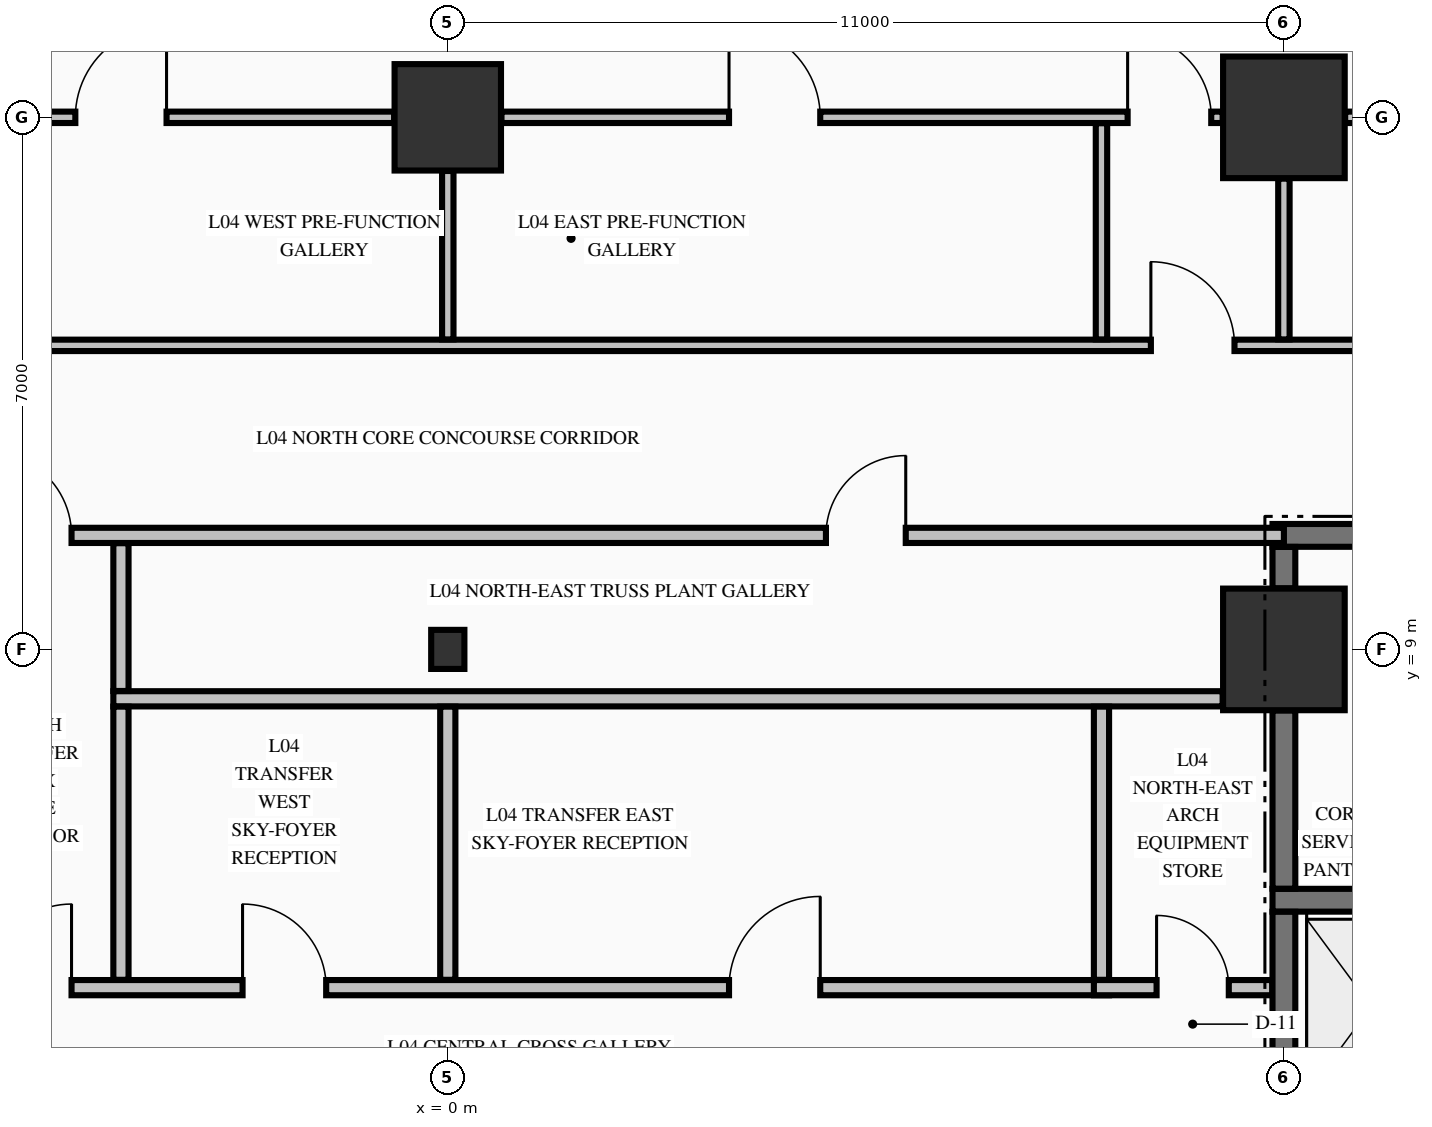
"""IFC4 building model, lengths in metres.
Left out: names, types, materials, properties, quantities, classifications, styles, units other than length and angle.
Written with IfcOpenShell. Run it as: python <this file> out.ifc"""

import sys

from ifc_helpers import new_model, si_unit, direction, frame, frame_2d, origin, origin_2d, place, context, subcontext, project, spatial, rectangle, i_section, extrude, element, fill, save


model = new_model("IFC4")
c1 = context("Model", 3, precision=1e-05, world=origin(), true_north=direction((0.0, 1.0)))
c2 = subcontext(c1, "Body", "Model", "MODEL_VIEW")
j1 = project(units=[si_unit("LENGTHUNIT", "METRE"), si_unit("PLANEANGLEUNIT", "RADIAN")], contexts=[c1])
p1 = place(None, origin())
s1 = spatial("IfcSite", under=j1, at=p1, CompositionType="ELEMENT")
p2 = place(p1, origin())
s2 = spatial("IfcBuilding", under=s1, at=p2, CompositionType="ELEMENT")
p3 = place(p2, frame((0.0, 0.0, 21.76)))
s3 = spatial("IfcBuildingStorey", under=s2, at=p3, CompositionType="ELEMENT", Elevation=21.76)
p4 = place(p3, frame((0.0, 9.0, -0.45), z_axis=(0.0, 0.0, 1.0), x_axis=(1.0, 0.0, 0.0)))
e1 = element("IfcColumn", 1, at=p4, inside=s3, PredefinedType="COLUMN", context=c2, shape_type="SweptSolid", body=[
    extrude(i_section(OverallWidth=0.437, OverallDepth=0.514, WebThickness=0.061, FlangeThickness=0.097, FilletRadius=0.015, at=origin_2d()), origin(), (0.0, 0.0, 1.0), 5.44),
])
p5 = place(p3, frame((0.0, 16.0, -0.45), z_axis=(0.0, 0.0, 1.0), x_axis=(1.0, 0.0, 0.0)))
e2 = element("IfcColumn", 2, at=p5, inside=s3, PredefinedType="COLUMN", context=c2, shape_type="SweptSolid", body=[
    extrude(rectangle(XDim=1.4, YDim=1.4, at=origin_2d()), origin(), (0.0, 0.0, 1.0), 5.44),
])
for number, where, z_axis, x_axis in (
    (3, (11.0, 9.0, -0.45), (0.0, 0.0, 1.0), (1.0, 0.0, 0.0)),
    (4, (11.0, 16.0, -0.45), (0.0, 0.0, 1.0), (1.0, 0.0, 0.0)),
):
    element("IfcColumn", number, at=place(p3, frame(where, z_axis=z_axis, x_axis=x_axis)), inside=s3, PredefinedType="COLUMN", context=c2, shape_type="SweptSolid", body=[
        extrude(rectangle(XDim=1.6, YDim=1.6, at=origin_2d()), origin(), (0.0, 0.0, 1.0), 5.44),
    ])
p6 = place(p3, frame((10.85, 5.7, 0.0), z_axis=(0.0, 0.0, 1.0), x_axis=(1.0, 0.0, 0.0)))
e5 = element("IfcWall", 5, at=p6, inside=s3, PredefinedType="SHEAR", context=c2, shape_type="SweptSolid", body=[
    extrude(rectangle(XDim=4.025, YDim=0.3, at=frame_2d((2.012, 0.0))), origin(), (0.0, 0.0, 1.0), 4.99),
])
p7 = place(p3, frame((10.85, 10.5, 0.0), z_axis=(0.0, 0.0, 1.0), x_axis=(1.0, 0.0, 0.0)))
e6 = element("IfcWall", 6, at=p7, inside=s3, PredefinedType="SHEAR", context=c2, shape_type="SweptSolid", body=[
    extrude(rectangle(XDim=3.85, YDim=0.3, at=frame_2d((1.925, 0.0))), origin(), (0.0, 0.0, 1.0), 4.99),
])
p8 = place(p7, frame((2.655, 0.0, 0.0)))
e7 = element("IfcOpeningElement", 7, at=p8, cuts=e6, PredefinedType="OPENING", context=c2, shape_type="SweptSolid", body=[
    extrude(rectangle(XDim=0.95, YDim=2.15, at=frame_2d((0.475, 1.075))), frame((0.0, 0.16, 0.0), z_axis=(0.0, -1.0, 0.0), x_axis=(1.0, 0.0, 0.0)), (0.0, 0.0, 1.0), 0.32),
])
p9 = place(p3, frame((-8.7, 4.55, 0.0), z_axis=(0.0, 0.0, 1.0), x_axis=(1.0, 0.0, 0.0)))
e8 = element("IfcWall", 8, at=p9, inside=s3, PredefinedType="PARTITIONING", context=c2, shape_type="SweptSolid", body=[
    extrude(rectangle(XDim=17.4, YDim=0.2, at=frame_2d((8.7, 0.0))), origin(), (0.0, 0.0, 1.0), 4.99),
])
p10 = place(p9, frame((2.65, 0.0, 0.0)))
e9 = element("IfcOpeningElement", 9, at=p10, cuts=e8, PredefinedType="OPENING", context=c2, shape_type="SweptSolid", body=[
    extrude(rectangle(XDim=1.1, YDim=2.15, at=frame_2d((0.55, 1.075))), frame((0.0, 0.11, 0.0), z_axis=(0.0, -1.0, 0.0), x_axis=(1.0, 0.0, 0.0)), (0.0, 0.0, 1.0), 0.22),
])
p11 = place(p9, frame((0.575, 0.0, 0.0)))
e10 = element("IfcOpeningElement", 10, at=p11, cuts=e8, PredefinedType="OPENING", context=c2, shape_type="SweptSolid", body=[
    extrude(rectangle(XDim=0.95, YDim=2.15, at=frame_2d((0.475, 1.075))), frame((0.0, 0.11, 0.0), z_axis=(0.0, -1.0, 0.0), x_axis=(1.0, 0.0, 0.0)), (0.0, 0.0, 1.0), 0.22),
])
p12 = place(p9, frame((6.0, 0.0, 0.0)))
e11 = element("IfcOpeningElement", 11, at=p12, cuts=e8, PredefinedType="OPENING", context=c2, shape_type="SweptSolid", body=[
    extrude(rectangle(XDim=1.1, YDim=2.15, at=frame_2d((0.55, 1.075))), frame((0.0, 0.11, 0.0), z_axis=(0.0, -1.0, 0.0), x_axis=(1.0, 0.0, 0.0)), (0.0, 0.0, 1.0), 0.22),
])
p13 = place(p9, frame((12.4, 0.0, 0.0)))
e12 = element("IfcOpeningElement", 12, at=p13, cuts=e8, PredefinedType="OPENING", context=c2, shape_type="SweptSolid", body=[
    extrude(rectangle(XDim=1.2, YDim=2.15, at=frame_2d((0.6, 1.075))), frame((0.0, 0.11, 0.0), z_axis=(0.0, -1.0, 0.0), x_axis=(1.0, 0.0, 0.0)), (0.0, 0.0, 1.0), 0.22),
])
p14 = place(p3, frame((8.5, 4.55, 0.0), z_axis=(0.0, 0.0, 1.0), x_axis=(1.0, 0.0, 0.0)))
e13 = element("IfcWall", 13, at=p14, inside=s3, PredefinedType="PARTITIONING", context=c2, shape_type="SweptSolid", body=[
    extrude(rectangle(XDim=2.347, YDim=0.2, at=frame_2d((1.173, 0.0))), origin(), (0.0, 0.0, 1.0), 4.99),
])
p15 = place(p14, frame((0.825, 0.0, 0.0)))
e14 = element("IfcOpeningElement", 14, at=p15, cuts=e13, PredefinedType="OPENING", context=c2, shape_type="SweptSolid", body=[
    extrude(rectangle(XDim=0.95, YDim=2.15, at=frame_2d((0.475, 1.075))), frame((0.0, 0.11, 0.0), z_axis=(0.0, -1.0, 0.0), x_axis=(1.0, 0.0, 0.0)), (0.0, 0.0, 1.0), 0.22),
])
p16 = place(p3, frame((-4.4, 8.35, 0.0), z_axis=(0.0, 0.0, 1.0), x_axis=(1.0, 0.0, 0.0)))
e15 = element("IfcWall", 15, at=p16, inside=s3, PredefinedType="PARTITIONING", context=c2, shape_type="SweptSolid", body=[
    extrude(rectangle(XDim=14.594, YDim=0.2, at=frame_2d((7.297, 0.0))), origin(), (0.0, 0.0, 1.0), 3.332),
])
p17 = place(p3, frame((-11.0, 10.5, 0.0), z_axis=(0.0, 0.0, 1.0), x_axis=(1.0, 0.0, 0.0)))
e16 = element("IfcWall", 16, at=p17, inside=s3, PredefinedType="PARTITIONING", context=c2, shape_type="SweptSolid", body=[
    extrude(rectangle(XDim=22.0, YDim=0.2, at=frame_2d((11.0, 0.0))), origin(), (0.0, 0.0, 1.0), 3.332),
])
p18 = place(p17, frame((4.95, 0.0, 0.0)))
e17 = element("IfcOpeningElement", 17, at=p18, cuts=e16, PredefinedType="OPENING", context=c2, shape_type="SweptSolid", body=[
    extrude(rectangle(XDim=1.1, YDim=2.15, at=frame_2d((0.55, 1.075))), frame((0.0, 0.11, 0.0), z_axis=(0.0, -1.0, 0.0), x_axis=(1.0, 0.0, 0.0)), (0.0, 0.0, 1.0), 0.22),
])
p19 = place(p17, frame((15.975, 0.0, 0.0)))
e18 = element("IfcOpeningElement", 18, at=p19, cuts=e16, PredefinedType="OPENING", context=c2, shape_type="SweptSolid", body=[
    extrude(rectangle(XDim=1.05, YDim=2.15, at=frame_2d((0.525, 1.075))), frame((0.0, 0.11, 0.0), z_axis=(0.0, -1.0, 0.0), x_axis=(1.0, 0.0, 0.0)), (0.0, 0.0, 1.0), 0.22),
])
p20 = place(p3, frame((-20.075, 13.0, 0.0), z_axis=(0.0, 0.0, 1.0), x_axis=(1.0, 0.0, 0.0)))
e19 = element("IfcWall", 19, at=p20, inside=s3, PredefinedType="PARTITIONING", context=c2, shape_type="SweptSolid", body=[
    extrude(rectangle(XDim=40.15, YDim=0.15, at=frame_2d((20.075, 0.0))), origin(), (0.0, 0.0, 1.0), 4.99),
])
p21 = place(p20, frame((9.725, 0.0, 0.0)))
e20 = element("IfcOpeningElement", 20, at=p21, cuts=e19, PredefinedType="OPENING", context=c2, shape_type="SweptSolid", body=[
    extrude(rectangle(XDim=1.1, YDim=2.15, at=frame_2d((0.55, 1.075))), frame((0.0, 0.085, 0.0), z_axis=(0.0, -1.0, 0.0), x_axis=(1.0, 0.0, 0.0)), (0.0, 0.0, 1.0), 0.17),
])
p22 = place(p20, frame((29.325, 0.0, 0.0)))
e21 = element("IfcOpeningElement", 21, at=p22, cuts=e19, PredefinedType="OPENING", context=c2, shape_type="SweptSolid", body=[
    extrude(rectangle(XDim=1.1, YDim=2.15, at=frame_2d((0.55, 1.075))), frame((0.0, 0.085, 0.0), z_axis=(0.0, -1.0, 0.0), x_axis=(1.0, 0.0, 0.0)), (0.0, 0.0, 1.0), 0.17),
])
p23 = place(p3, frame((-10.194, 16.0, 0.0), z_axis=(0.0, 0.0, 1.0), x_axis=(1.0, 0.0, 0.0)))
e22 = element("IfcWall", 22, at=p23, inside=s3, PredefinedType="PARTITIONING", context=c2, shape_type="SweptSolid", body=[
    extrude(rectangle(XDim=9.488, YDim=0.15, at=frame_2d((4.744, 0.0))), origin(), (0.0, 0.0, 1.0), 3.332),
])
p24 = place(p23, frame((0.15, 0.0, 0.0)))
e23 = element("IfcOpeningElement", 23, at=p24, cuts=e22, PredefinedType="OPENING", context=c2, shape_type="SweptSolid", body=[
    extrude(rectangle(XDim=1.1, YDim=2.15, at=frame_2d((0.55, 1.075))), frame((0.0, 0.085, 0.0), z_axis=(0.0, -1.0, 0.0), x_axis=(1.0, 0.0, 0.0)), (0.0, 0.0, 1.0), 0.17),
])
p25 = place(p23, frame((5.294, 0.0, 0.0)))
e24 = element("IfcOpeningElement", 24, at=p25, cuts=e22, PredefinedType="OPENING", context=c2, shape_type="SweptSolid", body=[
    extrude(rectangle(XDim=1.2, YDim=2.15, at=frame_2d((0.6, 1.075))), frame((0.0, 0.085, 0.0), z_axis=(0.0, -1.0, 0.0), x_axis=(1.0, 0.0, 0.0)), (0.0, 0.0, 1.0), 0.17),
])
p26 = place(p3, frame((0.706, 16.0, 0.0), z_axis=(0.0, 0.0, 1.0), x_axis=(1.0, 0.0, 0.0)))
e25 = element("IfcWall", 25, at=p26, inside=s3, PredefinedType="PARTITIONING", context=c2, shape_type="SweptSolid", body=[
    extrude(rectangle(XDim=9.488, YDim=0.15, at=frame_2d((4.744, 0.0))), origin(), (0.0, 0.0, 1.0), 3.332),
])
p27 = place(p26, frame((8.238, 0.0, 0.0)))
e26 = element("IfcOpeningElement", 26, at=p27, cuts=e25, PredefinedType="OPENING", context=c2, shape_type="SweptSolid", body=[
    extrude(rectangle(XDim=1.1, YDim=2.15, at=frame_2d((0.55, 1.075))), frame((0.0, 0.085, 0.0), z_axis=(0.0, -1.0, 0.0), x_axis=(1.0, 0.0, 0.0)), (0.0, 0.0, 1.0), 0.17),
])
p28 = place(p26, frame((2.994, 0.0, 0.0)))
e27 = element("IfcOpeningElement", 27, at=p28, cuts=e25, PredefinedType="OPENING", context=c2, shape_type="SweptSolid", body=[
    extrude(rectangle(XDim=1.2, YDim=2.15, at=frame_2d((0.6, 1.075))), frame((0.0, 0.085, 0.0), z_axis=(0.0, -1.0, 0.0), x_axis=(1.0, 0.0, 0.0)), (0.0, 0.0, 1.0), 0.17),
])
p29 = place(p3, frame((11.806, 16.0, 0.0), z_axis=(0.0, 0.0, 1.0), x_axis=(1.0, 0.0, 0.0)))
e28 = element("IfcWall", 28, at=p29, inside=s3, PredefinedType="PARTITIONING", context=c2, shape_type="SweptSolid", body=[
    extrude(rectangle(XDim=7.388, YDim=0.15, at=frame_2d((3.694, 0.0))), origin(), (0.0, 0.0, 1.0), 3.332),
])
p30 = place(p3, frame((11.0, 3.052, 0.0), z_axis=(0.0, 0.0, 1.0), x_axis=(0.0, 1.0, 0.0)))
e29 = element("IfcWall", 29, at=p30, inside=s3, PredefinedType="SHEAR", context=c2, shape_type="SweptSolid", body=[
    extrude(rectangle(XDim=2.496, YDim=0.3, at=frame_2d((1.248, 0.0))), origin(), (0.0, 0.0, 1.0), 4.99),
])
p31 = place(p3, frame((11.0, 5.852, 0.0), z_axis=(0.0, 0.0, 1.0), x_axis=(0.0, 1.0, 0.0)))
e30 = element("IfcWall", 30, at=p31, inside=s3, PredefinedType="SHEAR", context=c2, shape_type="SweptSolid", body=[
    extrude(rectangle(XDim=2.344, YDim=0.3, at=frame_2d((1.172, 0.0))), origin(), (0.0, 0.0, 1.0), 4.99),
])
p32 = place(p3, frame((11.0, 9.804, 0.0), z_axis=(0.0, 0.0, 1.0), x_axis=(0.0, 1.0, 0.0)))
e31 = element("IfcWall", 31, at=p32, inside=s3, PredefinedType="SHEAR", context=c2, shape_type="SweptSolid", body=[
    extrude(rectangle(XDim=0.544, YDim=0.3, at=frame_2d((0.272, 0.0))), origin(), (0.0, 0.0, 1.0), 4.99),
])
p33 = place(p3, frame((-4.3, 4.653, 0.0), z_axis=(0.0, 0.0, 1.0), x_axis=(0.0, 1.0, 0.0)))
e32 = element("IfcWall", 32, at=p33, inside=s3, PredefinedType="PARTITIONING", context=c2, shape_type="SweptSolid", body=[
    extrude(rectangle(XDim=3.594, YDim=0.2, at=frame_2d((1.797, 0.0))), origin(), (0.0, 0.0, 1.0), 4.99),
])
p34 = place(p3, frame((-4.3, 8.453, 0.0), z_axis=(0.0, 0.0, 1.0), x_axis=(0.0, 1.0, 0.0)))
e33 = element("IfcWall", 33, at=p34, inside=s3, PredefinedType="PARTITIONING", context=c2, shape_type="SweptSolid", body=[
    extrude(rectangle(XDim=1.944, YDim=0.2, at=frame_2d((0.972, 0.0))), origin(), (0.0, 0.0, 1.0), 4.99),
])
p35 = place(p3, frame((0.0, 4.653, 0.0), z_axis=(0.0, 0.0, 1.0), x_axis=(0.0, 1.0, 0.0)))
e34 = element("IfcWall", 34, at=p35, inside=s3, PredefinedType="PARTITIONING", context=c2, shape_type="SweptSolid", body=[
    extrude(rectangle(XDim=3.594, YDim=0.2, at=frame_2d((1.797, 0.0))), origin(), (0.0, 0.0, 1.0), 3.332),
])
p36 = place(p3, frame((0.0, 13.078, 0.0), z_axis=(0.0, 0.0, 1.0), x_axis=(0.0, 1.0, 0.0)))
e35 = element("IfcWall", 35, at=p36, inside=s3, PredefinedType="PARTITIONING", context=c2, shape_type="SweptSolid", body=[
    extrude(rectangle(XDim=2.216, YDim=0.15, at=frame_2d((1.108, 0.0))), origin(), (0.0, 0.0, 1.0), 3.332),
])
p37 = place(p3, frame((8.6, 4.653, 0.0), z_axis=(0.0, 0.0, 1.0), x_axis=(0.0, 1.0, 0.0)))
e36 = element("IfcWall", 36, at=p37, inside=s3, PredefinedType="PARTITIONING", context=c2, shape_type="SweptSolid", body=[
    extrude(rectangle(XDim=3.594, YDim=0.2, at=frame_2d((1.797, 0.0))), origin(), (0.0, 0.0, 1.0), 4.99),
])
p38 = place(p3, frame((8.6, 13.078, 0.0), z_axis=(0.0, 0.0, 1.0), x_axis=(0.0, 1.0, 0.0)))
e37 = element("IfcWall", 37, at=p38, inside=s3, PredefinedType="PARTITIONING", context=c2, shape_type="SweptSolid", body=[
    extrude(rectangle(XDim=2.844, YDim=0.15, at=frame_2d((1.422, 0.0))), origin(), (0.0, 0.0, 1.0), 4.99),
])
p39 = place(p3, frame((11.0, 13.078, 0.0), z_axis=(0.0, 0.0, 1.0), x_axis=(0.0, 1.0, 0.0)))
e38 = element("IfcWall", 38, at=p39, inside=s3, PredefinedType="PARTITIONING", context=c2, shape_type="SweptSolid", body=[
    extrude(rectangle(XDim=2.116, YDim=0.15, at=frame_2d((1.058, 0.0))), origin(), (0.0, 0.0, 1.0), 3.332),
])
p40 = place(p15, origin())
e39 = element("IfcDoor", 39, at=p40, inside=s3, OperationType="SINGLE_SWING_LEFT", PredefinedType="DOOR", context=c2, shape_type="SweptSolid", body=[
    extrude(rectangle(XDim=0.95, YDim=2.15, at=frame_2d((0.475, 1.075))), frame((0.0, 0.025, 0.0), z_axis=(0.0, -1.0, 0.0), x_axis=(1.0, 0.0, 0.0)), (0.0, 0.0, 1.0), 0.05),
])
fill(e14, e39)
p41 = place(p27, origin())
e40 = element("IfcDoor", 40, at=p41, inside=s3, OperationType="SINGLE_SWING_LEFT", PredefinedType="DOOR", context=c2, shape_type="SweptSolid", body=[
    extrude(rectangle(XDim=1.1, YDim=2.15, at=frame_2d((0.55, 1.075))), frame((0.0, 0.025, 0.0), z_axis=(0.0, -1.0, 0.0), x_axis=(1.0, 0.0, 0.0)), (0.0, 0.0, 1.0), 0.05),
])
fill(e26, e40)
p42 = place(p22, origin())
e41 = element("IfcDoor", 41, at=p42, inside=s3, OperationType="SINGLE_SWING_LEFT", PredefinedType="DOOR", context=c2, shape_type="SweptSolid", body=[
    extrude(rectangle(XDim=1.1, YDim=2.15, at=frame_2d((0.55, 1.075))), frame((0.0, 0.025, 0.0), z_axis=(0.0, -1.0, 0.0), x_axis=(1.0, 0.0, 0.0)), (0.0, 0.0, 1.0), 0.05),
])
fill(e21, e41)
p43 = place(p25, origin())
e42 = element("IfcDoor", 42, at=p43, inside=s3, OperationType="SINGLE_SWING_RIGHT", PredefinedType="DOOR", context=c2, shape_type="SweptSolid", body=[
    extrude(rectangle(XDim=1.2, YDim=2.15, at=frame_2d((0.6, 1.075))), frame((0.0, 0.025, 0.0), z_axis=(0.0, -1.0, 0.0), x_axis=(1.0, 0.0, 0.0)), (0.0, 0.0, 1.0), 0.05),
])
fill(e24, e42)
p44 = place(p28, origin())
e43 = element("IfcDoor", 43, at=p44, inside=s3, OperationType="SINGLE_SWING_LEFT", PredefinedType="DOOR", context=c2, shape_type="SweptSolid", body=[
    extrude(rectangle(XDim=1.2, YDim=2.15, at=frame_2d((0.6, 1.075))), frame((0.0, 0.025, 0.0), z_axis=(0.0, -1.0, 0.0), x_axis=(1.0, 0.0, 0.0)), (0.0, 0.0, 1.0), 0.05),
])
fill(e27, e43)
p45 = place(p10, origin())
e44 = element("IfcDoor", 44, at=p45, inside=s3, OperationType="SINGLE_SWING_RIGHT", PredefinedType="DOOR", context=c2, shape_type="SweptSolid", body=[
    extrude(rectangle(XDim=1.1, YDim=2.15, at=frame_2d((0.55, 1.075))), frame((0.0, 0.025, 0.0), z_axis=(0.0, -1.0, 0.0), x_axis=(1.0, 0.0, 0.0)), (0.0, 0.0, 1.0), 0.05),
])
fill(e9, e44)
p46 = place(p18, origin())
e45 = element("IfcDoor", 45, at=p46, inside=s3, OperationType="SINGLE_SWING_LEFT", PredefinedType="DOOR", context=c2, shape_type="SweptSolid", body=[
    extrude(rectangle(XDim=1.1, YDim=2.15, at=frame_2d((0.55, 1.075))), frame((0.0, 0.025, 0.0), z_axis=(0.0, -1.0, 0.0), x_axis=(1.0, 0.0, 0.0)), (0.0, 0.0, 1.0), 0.05),
])
fill(e17, e45)
p47 = place(p12, origin())
e46 = element("IfcDoor", 46, at=p47, inside=s3, OperationType="SINGLE_SWING_LEFT", PredefinedType="DOOR", context=c2, shape_type="SweptSolid", body=[
    extrude(rectangle(XDim=1.1, YDim=2.15, at=frame_2d((0.55, 1.075))), frame((0.0, 0.025, 0.0), z_axis=(0.0, -1.0, 0.0), x_axis=(1.0, 0.0, 0.0)), (0.0, 0.0, 1.0), 0.05),
])
fill(e11, e46)
p48 = place(p13, origin())
e47 = element("IfcDoor", 47, at=p48, inside=s3, OperationType="SINGLE_SWING_RIGHT", PredefinedType="DOOR", context=c2, shape_type="SweptSolid", body=[
    extrude(rectangle(XDim=1.2, YDim=2.15, at=frame_2d((0.6, 1.075))), frame((0.0, 0.025, 0.0), z_axis=(0.0, -1.0, 0.0), x_axis=(1.0, 0.0, 0.0)), (0.0, 0.0, 1.0), 0.05),
])
fill(e12, e47)
p49 = place(p19, origin())
e48 = element("IfcDoor", 48, at=p49, inside=s3, OperationType="SINGLE_SWING_RIGHT", PredefinedType="DOOR", context=c2, shape_type="SweptSolid", body=[
    extrude(rectangle(XDim=1.05, YDim=2.15, at=frame_2d((0.525, 1.075))), frame((0.0, 0.025, 0.0), z_axis=(0.0, -1.0, 0.0), x_axis=(1.0, 0.0, 0.0)), (0.0, 0.0, 1.0), 0.05),
])
fill(e18, e48)
save(model, sys.argv[1])
